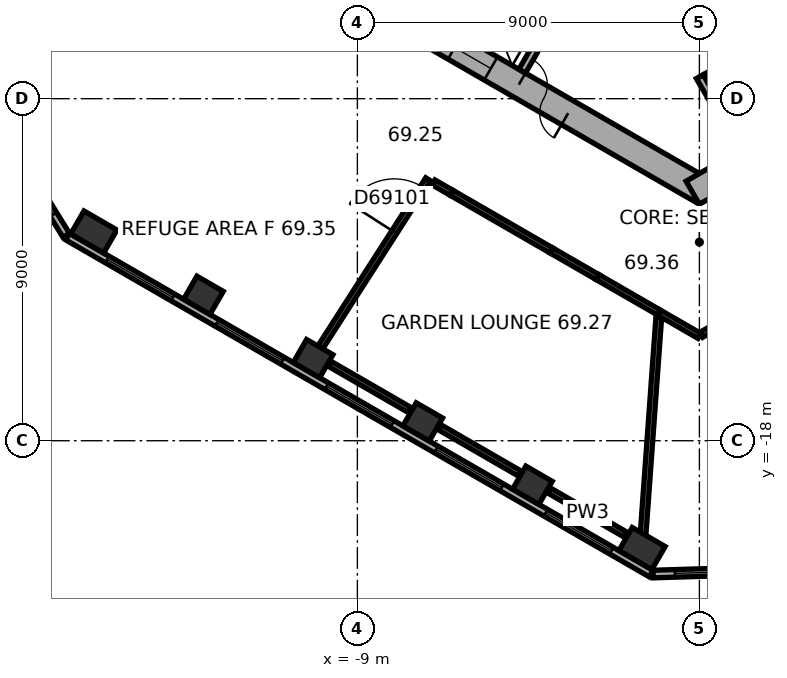
"""IFC4 building model, lengths in metres.
Left out: names, types, materials, properties, quantities, classifications, styles, units other than length and angle.
Written with IfcOpenShell. Run it as: python <this file> out.ifc"""

import sys

from ifc_helpers import new_model, si_unit, direction, frame, frame_2d, origin, origin_2d, place, context, subcontext, project, spatial, rectangle, extrude, element, fill, save


model = new_model("IFC4")
c1 = context("Model", 3, precision=1e-05, world=origin(), true_north=direction((0.0, 1.0)))
c2 = subcontext(c1, "Body", "Model", "MODEL_VIEW")
j1 = project(units=[si_unit("LENGTHUNIT", "METRE"), si_unit("PLANEANGLEUNIT", "RADIAN")], contexts=[c1])
p1 = place(None, origin())
s1 = spatial("IfcSite", under=j1, at=p1, CompositionType="ELEMENT")
p2 = place(p1, origin())
s2 = spatial("IfcBuilding", under=s1, at=p2, CompositionType="ELEMENT")
p3 = place(p2, frame((0.0, 0.0, 278.3)))
s3 = spatial("IfcBuildingStorey", under=s2, at=p3, CompositionType="ELEMENT", Elevation=278.3)
p4 = place(p3, frame((-15.936, -12.508, 0.0), z_axis=(0.0, 0.0, 1.0), x_axis=(0.866025403784, -0.5, 0.0)))
e1 = element("IfcColumn", 1, at=p4, inside=s3, PredefinedType="COLUMN", context=c2, shape_type="SweptSolid", body=[
    extrude(rectangle(XDim=1.0, YDim=0.7, at=origin_2d()), origin(), (0.0, 0.0, 1.0), 7.4),
])
for number, where, z_axis, x_axis in (
    (2, (-13.05, -14.174, 0.0), (0.0, 0.0, 1.0), (0.866, -0.5, 0.0)),
    (3, (-10.165, -15.84, 0.0), (0.0, 0.0, 1.0), (0.866, -0.5, 0.0)),
    (4, (-7.28, -17.505, 0.0), (0.0, 0.0, 1.0), (0.866, -0.5, 0.0)),
    (5, (-4.395, -19.171, 0.0), (0.0, 0.0, 1.0), (0.866, -0.5, 0.0)),
):
    element("IfcColumn", number, at=place(p3, frame(where, z_axis=z_axis, x_axis=x_axis)), inside=s3, PredefinedType="COLUMN", context=c2, shape_type="SweptSolid", body=[
        extrude(rectangle(XDim=0.8, YDim=0.7, at=origin_2d()), origin(), (0.0, 0.0, 1.0), 7.4),
    ])
p5 = place(p3, frame((-1.509, -20.837, 0.0), z_axis=(0.0, 0.0, 1.0), x_axis=(0.866025403784, -0.5, 0.0)))
e6 = element("IfcColumn", 6, at=p5, inside=s3, PredefinedType="COLUMN", context=c2, shape_type="SweptSolid", body=[
    extrude(rectangle(XDim=1.0, YDim=0.7, at=origin_2d()), origin(), (0.0, 0.0, 1.0), 7.4),
])
p6 = place(p3, frame((-10.025, -5.586, 0.0), z_axis=(0.0, 0.0, 1.0), x_axis=(0.866026453023, -0.499998182661, 0.0)))
e7 = element("IfcWall", 7, at=p6, inside=s3, PredefinedType="SHEAR", context=c2, shape_type="SweptSolid", body=[
    extrude(rectangle(XDim=11.778, YDim=0.7, at=frame_2d((5.889, 0.0))), origin(), (0.0, 0.0, 1.0), 7.4),
])
p7 = place(p6, frame((6.089, 0.0, 0.0)))
e8 = element("IfcOpeningElement", 8, at=p7, cuts=e7, PredefinedType="OPENING", context=c2, shape_type="SweptSolid", body=[
    extrude(rectangle(XDim=1.5, YDim=2.1, at=frame_2d((0.75, 1.05))), frame((0.0, 0.36, 0.0), z_axis=(0.0, -1.0, 0.0), x_axis=(1.0, 0.0, 0.0)), (0.0, 0.0, 1.0), 0.72),
])
p8 = place(p6, frame((1.539, 0.0, 0.0)))
e9 = element("IfcOpeningElement", 9, at=p8, cuts=e7, PredefinedType="OPENING", context=c2, shape_type="SweptSolid", body=[
    extrude(rectangle(XDim=1.1, YDim=2.1, at=frame_2d((0.55, 1.05))), frame((0.0, 0.36, 0.0), z_axis=(0.0, -1.0, 0.0), x_axis=(1.0, 0.0, 0.0)), (0.0, 0.0, 1.0), 0.72),
])
p9 = place(p6, frame((4.139, 0.0, 0.0)))
e10 = element("IfcOpeningElement", 10, at=p9, cuts=e7, PredefinedType="OPENING", context=c2, shape_type="SweptSolid", body=[
    extrude(rectangle(XDim=1.1, YDim=2.1, at=frame_2d((0.55, 1.05))), frame((0.0, 0.36, 0.0), z_axis=(0.0, -1.0, 0.0), x_axis=(1.0, 0.0, 0.0)), (0.0, 0.0, 1.0), 0.72),
])
p10 = place(p3, frame((-0.175, -11.475, 0.0), z_axis=(0.0, 0.0, 1.0), x_axis=(0.866026453023, 0.499998182661, 0.0)))
e11 = element("IfcWall", 11, at=p10, inside=s3, PredefinedType="SHEAR", context=c2, shape_type="SweptSolid", body=[
    extrude(rectangle(XDim=11.778, YDim=0.7, at=frame_2d((5.889, 0.0))), origin(), (0.0, 0.0, 1.0), 7.4),
])
p11 = place(p10, frame((2.439, 0.0, 0.0)))
e12 = element("IfcOpeningElement", 12, at=p11, cuts=e11, PredefinedType="OPENING", context=c2, shape_type="SweptSolid", body=[
    extrude(rectangle(XDim=1.1, YDim=2.1, at=frame_2d((0.55, 1.05))), frame((0.0, 0.36, 0.0), z_axis=(0.0, -1.0, 0.0), x_axis=(1.0, 0.0, 0.0)), (0.0, 0.0, 1.0), 0.72),
])
p12 = place(p10, frame((5.039, 0.0, 0.0)))
e13 = element("IfcOpeningElement", 13, at=p12, cuts=e11, PredefinedType="OPENING", context=c2, shape_type="SweptSolid", body=[
    extrude(rectangle(XDim=1.1, YDim=2.1, at=frame_2d((0.55, 1.05))), frame((0.0, 0.36, 0.0), z_axis=(0.0, -1.0, 0.0), x_axis=(1.0, 0.0, 0.0)), (0.0, 0.0, 1.0), 0.72),
])
p13 = place(p10, frame((7.639, 0.0, 0.0)))
e14 = element("IfcOpeningElement", 14, at=p13, cuts=e11, PredefinedType="OPENING", context=c2, shape_type="SweptSolid", body=[
    extrude(rectangle(XDim=1.1, YDim=2.1, at=frame_2d((0.55, 1.05))), frame((0.0, 0.36, 0.0), z_axis=(0.0, -1.0, 0.0), x_axis=(1.0, 0.0, 0.0)), (0.0, 0.0, 1.0), 0.72),
])
p14 = place(p3, frame((-18.706, -9.291, 0.0), z_axis=(0.0, 0.0, 1.0), x_axis=(0.526209683648, -0.850354848775, 0.0)))
e15 = element("IfcWall", 15, at=p14, inside=s3, PredefinedType="STANDARD", context=c2, shape_type="SweptSolid", body=[
    extrude(rectangle(XDim=3.886, YDim=0.2, at=frame_2d((1.943, 0.0))), origin(), (0.0, 0.0, 1.0), 7.4),
])
p15 = place(p14, frame((0.643, 0.0, 0.8)))
e16 = element("IfcOpeningElement", 16, at=p15, cuts=e15, PredefinedType="OPENING", context=c2, shape_type="SweptSolid", body=[
    extrude(rectangle(XDim=2.6, YDim=4.2, at=frame_2d((1.3, 2.1))), frame((0.0, 0.11, 0.0), z_axis=(0.0, -1.0, 0.0), x_axis=(1.0, 0.0, 0.0)), (0.0, 0.0, 1.0), 0.22),
])
p16 = place(p3, frame((-16.626, -12.629, 0.0), z_axis=(0.0, 0.0, 1.0), x_axis=(0.866026460444, -0.499998169808, 0.0)))
e17 = element("IfcWall", 17, at=p16, inside=s3, PredefinedType="STANDARD", context=c2, shape_type="SweptSolid", body=[
    extrude(rectangle(XDim=17.731, YDim=0.2, at=frame_2d((8.866, 0.0))), origin(), (0.0, 0.0, 1.0), 7.4),
])
p17 = place(p16, frame((1.203, 0.0, 0.8)))
e18 = element("IfcOpeningElement", 18, at=p17, cuts=e17, PredefinedType="OPENING", context=c2, shape_type="SweptSolid", body=[
    extrude(rectangle(XDim=2.0, YDim=4.2, at=frame_2d((1.0, 2.1))), frame((0.0, 0.11, 0.0), z_axis=(0.0, -1.0, 0.0), x_axis=(1.0, 0.0, 0.0)), (0.0, 0.0, 1.0), 0.22),
])
p18 = place(p16, frame((4.535, 0.0, 0.8)))
e19 = element("IfcOpeningElement", 19, at=p18, cuts=e17, PredefinedType="OPENING", context=c2, shape_type="SweptSolid", body=[
    extrude(rectangle(XDim=2.0, YDim=4.2, at=frame_2d((1.0, 2.1))), frame((0.0, 0.11, 0.0), z_axis=(0.0, -1.0, 0.0), x_axis=(1.0, 0.0, 0.0)), (0.0, 0.0, 1.0), 0.22),
])
p19 = place(p16, frame((7.867, 0.0, 0.8)))
e20 = element("IfcOpeningElement", 20, at=p19, cuts=e17, PredefinedType="OPENING", context=c2, shape_type="SweptSolid", body=[
    extrude(rectangle(XDim=2.0, YDim=4.2, at=frame_2d((1.0, 2.1))), frame((0.0, 0.11, 0.0), z_axis=(0.0, -1.0, 0.0), x_axis=(1.0, 0.0, 0.0)), (0.0, 0.0, 1.0), 0.22),
])
p20 = place(p16, frame((11.198, 0.0, 0.8)))
e21 = element("IfcOpeningElement", 21, at=p20, cuts=e17, PredefinedType="OPENING", context=c2, shape_type="SweptSolid", body=[
    extrude(rectangle(XDim=2.0, YDim=4.2, at=frame_2d((1.0, 2.1))), frame((0.0, 0.11, 0.0), z_axis=(0.0, -1.0, 0.0), x_axis=(1.0, 0.0, 0.0)), (0.0, 0.0, 1.0), 0.22),
])
p21 = place(p16, frame((14.53, 0.0, 0.8)))
e22 = element("IfcOpeningElement", 22, at=p21, cuts=e17, PredefinedType="OPENING", context=c2, shape_type="SweptSolid", body=[
    extrude(rectangle(XDim=2.0, YDim=4.2, at=frame_2d((1.0, 2.1))), frame((0.0, 0.11, 0.0), z_axis=(0.0, -1.0, 0.0), x_axis=(1.0, 0.0, 0.0)), (0.0, 0.0, 1.0), 0.22),
])
p22 = place(p3, frame((-1.217, -21.508, 0.0), z_axis=(0.0, 0.0, 1.0), x_axis=(0.99953295295, 0.030559384285, 0.0)))
e23 = element("IfcWall", 23, at=p22, inside=s3, PredefinedType="STANDARD", context=c2, shape_type="SweptSolid", body=[
    extrude(rectangle(XDim=3.747, YDim=0.2, at=frame_2d((1.874, 0.0))), origin(), (0.0, 0.0, 1.0), 7.4),
])
p23 = place(p22, frame((0.573, 0.0, 0.8)))
e24 = element("IfcOpeningElement", 24, at=p23, cuts=e23, PredefinedType="OPENING", context=c2, shape_type="SweptSolid", body=[
    extrude(rectangle(XDim=2.6, YDim=4.2, at=frame_2d((1.3, 2.1))), frame((0.0, 0.11, 0.0), z_axis=(0.0, -1.0, 0.0), x_axis=(1.0, 0.0, 0.0)), (0.0, 0.0, 1.0), 0.22),
])
p24 = place(p3, frame((-3.563, -6.372, 0.0), z_axis=(0.0, 0.0, 1.0), x_axis=(-0.499994660107, -0.866028486751, 0.0)))
e25 = element("IfcWall", 25, at=p24, inside=s3, PredefinedType="PARTITIONING", context=c2, shape_type="SweptSolid", body=[
    extrude(rectangle(XDim=2.2, YDim=0.2, at=frame_2d((1.1, 0.0))), origin(), (0.0, 0.0, 1.0), 7.12),
])
p25 = place(p3, frame((-0.024, -8.559, 0.0), z_axis=(0.0, 0.0, 1.0), x_axis=(0.866026010844, 0.49999894854, 0.0)))
e26 = element("IfcWall", 26, at=p25, inside=s3, PredefinedType="PARTITIONING", context=c2, shape_type="SweptSolid", body=[
    extrude(rectangle(XDim=8.0, YDim=0.2, at=frame_2d((4.0, 0.0))), origin(), (0.0, 0.0, 1.0), 7.12),
])
p26 = place(p3, frame((0.013, -8.422, 0.0), z_axis=(0.0, 0.0, 1.0), x_axis=(0.500077893725, -0.86598042715, 0.0)))
e27 = element("IfcWall", 27, at=p26, inside=s3, PredefinedType="PARTITIONING", context=c2, shape_type="SweptSolid", body=[
    extrude(rectangle(XDim=2.2, YDim=0.2, at=frame_2d((1.1, 0.0))), origin(), (0.0, 0.0, 1.0), 7.12),
])
p27 = place(p3, frame((-1.558, -3.902, 0.0), z_axis=(0.0, 0.0, 1.0), x_axis=(0.499977259774, -0.866038532462, 0.0)))
e28 = element("IfcWall", 28, at=p27, inside=s3, PredefinedType="SHEAR", context=c2, shape_type="SweptSolid", body=[
    extrude(rectangle(XDim=4.7, YDim=0.3, at=frame_2d((2.35, 0.0))), origin(), (0.0, 0.0, 1.0), 7.12),
])
p28 = place(p27, frame((0.8, 0.0, 0.0)))
e29 = element("IfcOpeningElement", 29, at=p28, cuts=e28, PredefinedType="OPENING", context=c2, shape_type="SweptSolid", body=[
    extrude(rectangle(XDim=1.2, YDim=2.1, at=frame_2d((0.6, 1.05))), frame((0.0, 0.16, 0.0), z_axis=(0.0, -1.0, 0.0), x_axis=(1.0, 0.0, 0.0)), (0.0, 0.0, 1.0), 0.32),
])
p29 = place(p3, frame((-1.935, -20.475, 0.0), z_axis=(0.0, 0.0, 1.0), x_axis=(-0.866082714023, 0.499900722615, 0.0)))
e30 = element("IfcWall", 30, at=p29, inside=s3, PredefinedType="PARTITIONING", context=c2, shape_type="SweptSolid", body=[
    extrude(rectangle(XDim=2.332, YDim=0.15, at=frame_2d((1.166, 0.0))), origin(), (0.0, 0.0, 1.0), 6.62),
])
for number, where, z_axis, x_axis in (
    (31, (-4.734, -18.86, 0.0), (0.0, 0.0, 1.0), (-0.866, 0.5, 0.0)),
    (32, (-7.619, -17.194, 0.0), (0.0, 0.0, 1.0), (-0.866, 0.5, 0.0)),
):
    element("IfcWall", number, at=place(p3, frame(where, z_axis=z_axis, x_axis=x_axis)), inside=s3, PredefinedType="PARTITIONING", context=c2, shape_type="SweptSolid", body=[
        extrude(rectangle(XDim=2.432, YDim=0.15, at=frame_2d((1.216, 0.0))), origin(), (0.0, 0.0, 1.0), 6.62),
    ])
p30 = place(p3, frame((-9.976, -15.545, 0.0), z_axis=(0.0, 0.0, 1.0), x_axis=(0.540123567873, 0.841585724349, 0.0)))
e33 = element("IfcWall", 33, at=p30, inside=s3, PredefinedType="PARTITIONING", context=c2, shape_type="SweptSolid", body=[
    extrude(rectangle(XDim=5.256, YDim=0.15, at=frame_2d((2.628, 0.0))), origin(), (0.0, 0.0, 1.0), 6.57),
])
p31 = place(p30, frame((3.606, 0.0, 0.0)))
e34 = element("IfcOpeningElement", 34, at=p31, cuts=e33, PredefinedType="OPENING", context=c2, shape_type="SweptSolid", body=[
    extrude(rectangle(XDim=1.4, YDim=2.4, at=frame_2d((0.7, 1.2))), frame((0.0, 0.085, 0.0), z_axis=(0.0, -1.0, 0.0), x_axis=(1.0, 0.0, 0.0)), (0.0, 0.0, 1.0), 0.17),
])
p32 = place(p3, frame((0.052, -15.212, 0.0), z_axis=(0.0, 0.0, 1.0), x_axis=(0.866171626203, 0.499746649774, 0.0)))
e35 = element("IfcWall", 35, at=p32, inside=s3, PredefinedType="PARTITIONING", context=c2, shape_type="SweptSolid", body=[
    extrude(rectangle(XDim=0.582, YDim=0.15, at=frame_2d((0.291, 0.0))), origin(), (0.0, 0.0, 1.0), 7.12),
])
p33 = place(p3, frame((-1.068, -14.75, 0.0), z_axis=(0.0, 0.0, 1.0), x_axis=(-0.072252084435, -0.997386402702, 0.0)))
e36 = element("IfcWall", 36, at=p33, inside=s3, PredefinedType="PARTITIONING", context=c2, shape_type="SweptSolid", body=[
    extrude(rectangle(XDim=5.714, YDim=0.15, at=frame_2d((2.857, 0.0))), origin(), (0.0, 0.0, 1.0), 7.12),
])
p34 = place(p3, frame((-1.06, -14.631, 0.0), z_axis=(0.0, 0.0, 1.0), x_axis=(0.866172295251, -0.499745490164, 0.0)))
e37 = element("IfcWall", 37, at=p34, inside=s3, PredefinedType="PARTITIONING", context=c2, shape_type="SweptSolid", body=[
    extrude(rectangle(XDim=1.223, YDim=0.15, at=frame_2d((0.612, 0.0))), origin(), (0.0, 0.0, 1.0), 7.12),
])
p35 = place(p3, frame((-1.06, -14.631, 0.0), z_axis=(0.0, 0.0, 1.0), x_axis=(-0.8659514991, 0.500127984827, 0.0)))
e38 = element("IfcWall", 38, at=p35, inside=s3, PredefinedType="PARTITIONING", context=c2, shape_type="SweptSolid", body=[
    extrude(rectangle(XDim=1.876, YDim=0.15, at=frame_2d((0.938, 0.0))), origin(), (0.0, 0.0, 1.0), 7.12),
])
p36 = place(p3, frame((-3.888, -12.998, 0.0), z_axis=(0.0, 0.0, 1.0), x_axis=(0.866094923709, -0.499879568622, 0.0)))
e39 = element("IfcWall", 39, at=p36, inside=s3, PredefinedType="PARTITIONING", context=c2, shape_type="SweptSolid", body=[
    extrude(rectangle(XDim=1.39, YDim=0.15, at=frame_2d((0.695, 0.0))), origin(), (0.0, 0.0, 1.0), 7.12),
])
p37 = place(p3, frame((-3.888, -12.998, 0.0), z_axis=(0.0, 0.0, 1.0), x_axis=(-0.865984422536, 0.500070974888, 0.0)))
e40 = element("IfcWall", 40, at=p37, inside=s3, PredefinedType="PARTITIONING", context=c2, shape_type="SweptSolid", body=[
    extrude(rectangle(XDim=3.032, YDim=0.15, at=frame_2d((1.516, 0.0))), origin(), (0.0, 0.0, 1.0), 7.12),
])
p38 = place(p3, frame((-6.996, -11.203, 0.0), z_axis=(0.0, 0.0, 1.0), x_axis=(0.866025182435, -0.500000383388, 0.0)))
e41 = element("IfcWall", 41, at=p38, inside=s3, PredefinedType="PARTITIONING", context=c2, shape_type="SweptSolid", body=[
    extrude(rectangle(XDim=0.558, YDim=0.15, at=frame_2d((0.279, 0.0))), origin(), (0.0, 0.0, 1.0), 7.12),
])
p39 = place(p15, origin())
e42 = element("IfcWindow", 42, at=p39, inside=s3, PartitioningType="SINGLE_PANEL", PredefinedType="WINDOW", context=c2, shape_type="SweptSolid", body=[
    extrude(rectangle(XDim=2.6, YDim=4.2, at=frame_2d((1.3, 2.1))), frame((0.0, 0.03, 0.0), z_axis=(0.0, -1.0, 0.0), x_axis=(1.0, 0.0, 0.0)), (0.0, 0.0, 1.0), 0.06),
])
fill(e16, e42)
p40 = place(p17, origin())
e43 = element("IfcWindow", 43, at=p40, inside=s3, PartitioningType="SINGLE_PANEL", PredefinedType="WINDOW", context=c2, shape_type="SweptSolid", body=[
    extrude(rectangle(XDim=2.0, YDim=4.2, at=frame_2d((1.0, 2.1))), frame((0.0, 0.03, 0.0), z_axis=(0.0, -1.0, 0.0), x_axis=(1.0, 0.0, 0.0)), (0.0, 0.0, 1.0), 0.06),
])
fill(e18, e43)
p41 = place(p18, origin())
e44 = element("IfcWindow", 44, at=p41, inside=s3, PartitioningType="SINGLE_PANEL", PredefinedType="WINDOW", context=c2, shape_type="SweptSolid", body=[
    extrude(rectangle(XDim=2.0, YDim=4.2, at=frame_2d((1.0, 2.1))), frame((0.0, 0.03, 0.0), z_axis=(0.0, -1.0, 0.0), x_axis=(1.0, 0.0, 0.0)), (0.0, 0.0, 1.0), 0.06),
])
fill(e19, e44)
p42 = place(p19, origin())
e45 = element("IfcWindow", 45, at=p42, inside=s3, PartitioningType="SINGLE_PANEL", PredefinedType="WINDOW", context=c2, shape_type="SweptSolid", body=[
    extrude(rectangle(XDim=2.0, YDim=4.2, at=frame_2d((1.0, 2.1))), frame((0.0, 0.03, 0.0), z_axis=(0.0, -1.0, 0.0), x_axis=(1.0, 0.0, 0.0)), (0.0, 0.0, 1.0), 0.06),
])
fill(e20, e45)
p43 = place(p20, origin())
e46 = element("IfcWindow", 46, at=p43, inside=s3, PartitioningType="SINGLE_PANEL", PredefinedType="WINDOW", context=c2, shape_type="SweptSolid", body=[
    extrude(rectangle(XDim=2.0, YDim=4.2, at=frame_2d((1.0, 2.1))), frame((0.0, 0.03, 0.0), z_axis=(0.0, -1.0, 0.0), x_axis=(1.0, 0.0, 0.0)), (0.0, 0.0, 1.0), 0.06),
])
fill(e21, e46)
p44 = place(p21, origin())
e47 = element("IfcWindow", 47, at=p44, inside=s3, PartitioningType="SINGLE_PANEL", PredefinedType="WINDOW", context=c2, shape_type="SweptSolid", body=[
    extrude(rectangle(XDim=2.0, YDim=4.2, at=frame_2d((1.0, 2.1))), frame((0.0, 0.03, 0.0), z_axis=(0.0, -1.0, 0.0), x_axis=(1.0, 0.0, 0.0)), (0.0, 0.0, 1.0), 0.06),
])
fill(e22, e47)
p45 = place(p23, origin())
e48 = element("IfcWindow", 48, at=p45, inside=s3, PartitioningType="SINGLE_PANEL", PredefinedType="WINDOW", context=c2, shape_type="SweptSolid", body=[
    extrude(rectangle(XDim=2.6, YDim=4.2, at=frame_2d((1.3, 2.1))), frame((0.0, 0.03, 0.0), z_axis=(0.0, -1.0, 0.0), x_axis=(1.0, 0.0, 0.0)), (0.0, 0.0, 1.0), 0.06),
])
fill(e24, e48)
p46 = place(p7, origin())
e49 = element("IfcDoor", 49, at=p46, inside=s3, OperationType="DOUBLE_DOOR_SINGLE_SWING", PredefinedType="DOOR", context=c2, shape_type="SweptSolid", body=[
    extrude(rectangle(XDim=1.5, YDim=2.1, at=frame_2d((0.75, 1.05))), frame((0.0, 0.025, 0.0), z_axis=(0.0, -1.0, 0.0), x_axis=(1.0, 0.0, 0.0)), (0.0, 0.0, 1.0), 0.05),
])
fill(e8, e49)
p47 = place(p9, origin())
e50 = element("IfcDoor", 50, at=p47, inside=s3, OperationType="DOUBLE_DOOR_SLIDING", PredefinedType="DOOR", context=c2, shape_type="SweptSolid", body=[
    extrude(rectangle(XDim=1.1, YDim=2.1, at=frame_2d((0.55, 1.05))), frame((0.0, 0.025, 0.0), z_axis=(0.0, -1.0, 0.0), x_axis=(1.0, 0.0, 0.0)), (0.0, 0.0, 1.0), 0.05),
])
fill(e10, e50)
p48 = place(p31, origin())
e51 = element("IfcDoor", 51, at=p48, inside=s3, OperationType="SINGLE_SWING_LEFT", PredefinedType="DOOR", context=c2, shape_type="SweptSolid", body=[
    extrude(rectangle(XDim=1.4, YDim=2.4, at=frame_2d((0.7, 1.2))), frame((0.0, 0.025, 0.0), z_axis=(0.0, -1.0, 0.0), x_axis=(1.0, 0.0, 0.0)), (0.0, 0.0, 1.0), 0.05),
])
fill(e34, e51)
save(model, sys.argv[1])
